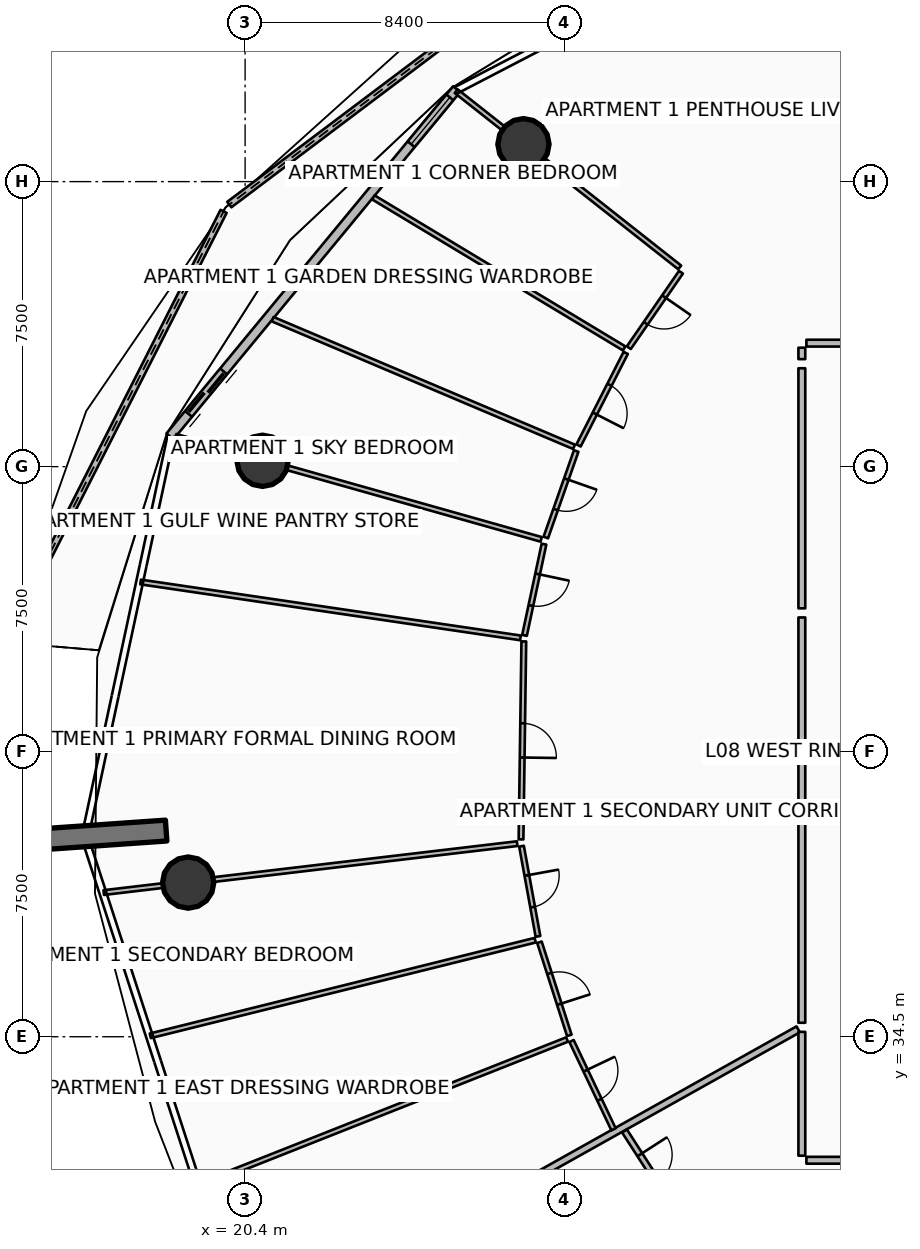
"""IFC4 building model, lengths in metres.
Left out: names, types, materials, properties, quantities, classifications, styles, units other than length and angle.
Written with IfcOpenShell. Run it as: python <this file> out.ifc"""

import sys

from ifc_helpers import new_model, si_unit, direction, frame, frame_2d, origin, origin_2d, place, context, subcontext, project, spatial, polyline, rectangle, circle, outline, extrude, element, fill, save


model = new_model("IFC4")
c1 = context("Model", 3, precision=1e-05, world=origin(), true_north=direction((0.0, 1.0)))
c2 = subcontext(c1, "Body", "Model", "MODEL_VIEW")
j1 = project(units=[si_unit("LENGTHUNIT", "METRE"), si_unit("PLANEANGLEUNIT", "RADIAN")], contexts=[c1])
p1 = place(None, origin())
s1 = spatial("IfcSite", under=j1, at=p1, CompositionType="ELEMENT")
p2 = place(p1, origin())
s2 = spatial("IfcBuilding", under=s1, at=p2, CompositionType="ELEMENT")
p3 = place(p2, frame((0.0, 0.0, 37.65)))
s3 = spatial("IfcBuildingStorey", under=s2, at=p3, CompositionType="ELEMENT", Elevation=37.65)
p4 = place(p3, frame((18.322, 39.925, 0.0), z_axis=(0.0, 0.0, 1.0), x_axis=(-0.997564163539, -0.069754853754, 0.0)))
e1 = element("IfcWall", 1, at=p4, inside=s3, PredefinedType="SOLIDWALL", context=c2, shape_type="SweptSolid", body=[
    extrude(rectangle(XDim=3.5, YDim=0.55, at=frame_2d((1.75, 0.0))), origin(), (0.0, 0.0, 1.0), 3.75),
])
for number, where, z_axis, x_axis in (
    (2, (27.724, 57.984, 0.0), (0.0, 0.0, 1.0), (1.0, 0.0, 0.0)),
    (3, (20.859, 49.655, 0.0), (0.0, 0.0, 1.0), (1.0, 0.0, 0.0)),
    (4, (18.902, 38.556, 0.0), (0.0, 0.0, 1.0), (1.0, 0.0, 0.0)),
):
    element("IfcColumn", number, at=place(p3, frame(where, z_axis=z_axis, x_axis=x_axis)), inside=s3, PredefinedType="COLUMN", context=c2, shape_type="SweptSolid", body=[
        extrude(circle(Radius=0.675, at=origin_2d()), origin(), (0.0, 0.0, 1.0), 3.5),
    ])
p5 = place(p3, frame((29.413, 63.495, 0.0), z_axis=(0.0, 0.0, 1.0), x_axis=(-0.798916487869, -0.601441971773, 0.0)))
e5 = element("IfcWall", 5, at=p5, inside=s3, PredefinedType="PARAPET", context=c2, shape_type="SweptSolid", body=[
    extrude(outline(polyline([(0.0, 0.0), (11.803, 0.0), (11.803, 1.348), (5.902, 1.182), (0.0, 1.12), (0.0, 0.0)])), frame((0.0, 0.09, 0.0), z_axis=(0.0, -1.0, 0.0), x_axis=(1.0, 0.0, 0.0)), (0.0, 0.0, 1.0), 0.18),
])
p6 = place(p3, frame((19.833, 56.217, 0.0), z_axis=(0.0, 0.0, 1.0), x_axis=(-0.452795448166, -0.891614424581, 0.0)))
e6 = element("IfcWall", 6, at=p6, inside=s3, PredefinedType="PARAPET", context=c2, shape_type="SweptSolid", body=[
    extrude(outline(polyline([(0.0, 0.0), (12.717, 0.0), (12.717, 1.747), (6.358, 1.562), (0.0, 1.348), (0.0, 0.0)])), frame((0.0, 0.09, 0.0), z_axis=(0.0, -1.0, 0.0), x_axis=(1.0, 0.0, 0.0)), (0.0, 0.0, 1.0), 0.18),
])
p7 = place(p3, frame((25.967, 59.433, 0.0), z_axis=(0.0, 0.0, 1.0), x_axis=(-0.636674332663, -0.771132799281, 0.0)))
e7 = element("IfcWall", 7, at=p7, inside=s3, PredefinedType="SOLIDWALL", context=c2, shape_type="SweptSolid", body=[
    extrude(rectangle(XDim=11.851, YDim=0.24, at=frame_2d((5.926, 0.0))), origin(), (0.0, 0.0, 1.0), 2.45),
])
p8 = place(p7, frame((9.631, 0.0, 0.0)))
e8 = element("IfcOpeningElement", 8, at=p8, cuts=e7, PredefinedType="OPENING", context=c2, shape_type="SweptSolid", body=[
    extrude(rectangle(XDim=1.45, YDim=2.15, at=frame_2d((0.725, 1.075))), frame((0.0, 0.13, 0.0), z_axis=(0.0, -1.0, 0.0), x_axis=(1.0, 0.0, 0.0)), (0.0, 0.0, 1.0), 0.26),
])
p9 = place(p7, frame((0.28, 0.0, 0.65)))
e9 = element("IfcOpeningElement", 9, at=p9, cuts=e7, PredefinedType="OPENING", context=c2, shape_type="SweptSolid", body=[
    extrude(rectangle(XDim=1.6, YDim=1.5, at=frame_2d((0.8, 0.75))), frame((0.0, 0.13, 0.0), z_axis=(0.0, -1.0, 0.0), x_axis=(1.0, 0.0, 0.0)), (0.0, 0.0, 1.0), 0.26),
])
p10 = place(p3, frame((34.954, 34.694, 0.0), z_axis=(0.0, 0.0, 1.0), x_axis=(-0.872493465611, -0.488625779577, 0.0)))
e10 = element("IfcWall", 10, at=p10, inside=s3, PredefinedType="PARTITIONING", context=c2, shape_type="SweptSolid", body=[
    extrude(rectangle(XDim=16.586, YDim=0.18, at=frame_2d((8.293, 0.0))), origin(), (0.0, 0.0, 1.0), 2.867),
])
p11 = place(p3, frame((41.86, 52.75, 0.0), z_axis=(0.0, 0.0, 1.0), x_axis=(-1.0, 0.0, 0.0)))
e11 = element("IfcWall", 11, at=p11, inside=s3, PredefinedType="PARTITIONING", context=c2, shape_type="SweptSolid", body=[
    extrude(rectangle(XDim=6.69, YDim=0.18, at=frame_2d((3.345, 0.0))), origin(), (0.0, 0.0, 1.0), 2.867),
])
p12 = place(p11, frame((2.795, 0.0, 0.0)))
e12 = element("IfcOpeningElement", 12, at=p12, cuts=e11, PredefinedType="OPENING", context=c2, shape_type="SweptSolid", body=[
    extrude(rectangle(XDim=1.1, YDim=2.1, at=frame_2d((0.55, 1.05))), frame((0.0, 0.1, 0.0), z_axis=(0.0, -1.0, 0.0), x_axis=(1.0, 0.0, 0.0)), (0.0, 0.0, 1.0), 0.2),
])
p13 = place(p3, frame((35.05, 52.63, 0.0), z_axis=(0.0, 0.0, 1.0), x_axis=(0.0, -1.0, 0.0)))
e13 = element("IfcWall", 13, at=p13, inside=s3, PredefinedType="PARTITIONING", context=c2, shape_type="SweptSolid", body=[
    extrude(rectangle(XDim=0.301, YDim=0.18, at=frame_2d((0.15, 0.0))), origin(), (0.0, 0.0, 1.0), 2.867),
])
p14 = place(p3, frame((37.943, 59.958, 0.0), z_axis=(0.0, 0.0, 1.0), x_axis=(-0.488606395453, 0.872504321091, 0.0)))
e14 = element("IfcWall", 14, at=p14, inside=s3, PredefinedType="PARTITIONING", context=c2, shape_type="SweptSolid", body=[
    extrude(rectangle(XDim=4.913, YDim=0.125, at=frame_2d((2.457, 0.0))), origin(), (0.0, 0.0, 1.0), 2.867),
])
p15 = place(p3, frame((35.05, 52.089, 0.0), z_axis=(0.0, 0.0, 1.0), x_axis=(0.0, -1.0, 0.0)))
e15 = element("IfcWall", 15, at=p15, inside=s3, PredefinedType="PARTITIONING", context=c2, shape_type="SweptSolid", body=[
    extrude(rectangle(XDim=6.317, YDim=0.18, at=frame_2d((3.158, 0.0))), origin(), (0.0, 0.0, 1.0), 2.867),
])
p16 = place(p3, frame((31.836, 54.743, 0.0), z_axis=(0.0, 0.0, 1.0), x_axis=(-0.785333171854, 0.619073347178, 0.0)))
e16 = element("IfcWall", 16, at=p16, inside=s3, PredefinedType="PARTITIONING", context=c2, shape_type="SweptSolid", body=[
    extrude(rectangle(XDim=7.489, YDim=0.125, at=frame_2d((3.745, 0.0))), origin(), (0.0, 0.0, 1.0), 2.867),
])
p17 = place(p3, frame((30.375, 52.611, 0.0), z_axis=(0.0, 0.0, 1.0), x_axis=(-0.856697740307, 0.515818748936, 0.0)))
e17 = element("IfcWall", 17, at=p17, inside=s3, PredefinedType="PARTITIONING", context=c2, shape_type="SweptSolid", body=[
    extrude(rectangle(XDim=7.704, YDim=0.125, at=frame_2d((3.852, 0.0))), origin(), (0.0, 0.0, 1.0), 2.94),
])
p18 = place(p3, frame((29.055, 50.022, 0.0), z_axis=(0.0, 0.0, 1.0), x_axis=(-0.920841617163, 0.389936810395, 0.0)))
e18 = element("IfcWall", 18, at=p18, inside=s3, PredefinedType="PARTITIONING", context=c2, shape_type="SweptSolid", body=[
    extrude(rectangle(XDim=8.613, YDim=0.125, at=frame_2d((4.306, 0.0))), origin(), (0.0, 0.0, 1.0), 2.94),
])
p19 = place(p3, frame((31.869, 54.615, 0.0), z_axis=(0.0, 0.0, 1.0), x_axis=(-0.568588801709, -0.822621890404, 0.0)))
e19 = element("IfcWall", 19, at=p19, inside=s3, PredefinedType="PARTITIONING", context=c2, shape_type="SweptSolid", body=[
    extrude(rectangle(XDim=2.412, YDim=0.125, at=frame_2d((1.206, 0.0))), origin(), (0.0, 0.0, 1.0), 2.867),
])
p20 = place(p19, frame((0.781, 0.0, 0.0)))
e20 = element("IfcOpeningElement", 20, at=p20, cuts=e19, PredefinedType="OPENING", context=c2, shape_type="SweptSolid", body=[
    extrude(rectangle(XDim=0.85, YDim=2.06, at=frame_2d((0.425, 1.03))), frame((0.0, 0.073, 0.0), z_axis=(0.0, -1.0, 0.0), x_axis=(1.0, 0.0, 0.0)), (0.0, 0.0, 1.0), 0.145),
])
p21 = place(p3, frame((30.416, 52.493, 0.0), z_axis=(0.0, 0.0, 1.0), x_axis=(-0.454024795493, -0.890989048798, 0.0)))
e21 = element("IfcWall", 21, at=p21, inside=s3, PredefinedType="PARTITIONING", context=c2, shape_type="SweptSolid", body=[
    extrude(rectangle(XDim=2.733, YDim=0.125, at=frame_2d((1.367, 0.0))), origin(), (0.0, 0.0, 1.0), 2.94),
])
p22 = place(p21, frame((0.942, 0.0, 0.0)))
e22 = element("IfcOpeningElement", 22, at=p22, cuts=e21, PredefinedType="OPENING", context=c2, shape_type="SweptSolid", body=[
    extrude(rectangle(XDim=0.85, YDim=2.06, at=frame_2d((0.425, 1.03))), frame((0.0, 0.073, 0.0), z_axis=(0.0, -1.0, 0.0), x_axis=(1.0, 0.0, 0.0)), (0.0, 0.0, 1.0), 0.145),
])
p23 = place(p3, frame((29.112, 49.911, 0.0), z_axis=(0.0, 0.0, 1.0), x_axis=(-0.331369117911, -0.943501196446, 0.0)))
e23 = element("IfcWall", 23, at=p23, inside=s3, PredefinedType="PARTITIONING", context=c2, shape_type="SweptSolid", body=[
    extrude(rectangle(XDim=2.412, YDim=0.125, at=frame_2d((1.206, 0.0))), origin(), (0.0, 0.0, 1.0), 2.867),
])
p24 = place(p23, frame((0.781, 0.0, 0.0)))
e24 = element("IfcOpeningElement", 24, at=p24, cuts=e23, PredefinedType="OPENING", context=c2, shape_type="SweptSolid", body=[
    extrude(rectangle(XDim=0.85, YDim=2.06, at=frame_2d((0.425, 1.03))), frame((0.0, 0.073, 0.0), z_axis=(0.0, -1.0, 0.0), x_axis=(1.0, 0.0, 0.0)), (0.0, 0.0, 1.0), 0.145),
])
p25 = place(p3, frame((35.05, 45.532, 0.0), z_axis=(0.0, 0.0, 1.0), x_axis=(0.0, -1.0, 0.0)))
e25 = element("IfcWall", 25, at=p25, inside=s3, PredefinedType="PARTITIONING", context=c2, shape_type="SweptSolid", body=[
    extrude(rectangle(XDim=4.945, YDim=0.18, at=frame_2d((2.472, 0.0))), origin(), (0.0, 0.0, 1.0), 2.867),
])
p26 = place(p3, frame((28.19, 47.587, 0.0), z_axis=(0.0, 0.0, 1.0), x_axis=(-0.962452458747, 0.271450298675, 0.0)))
e26 = element("IfcWall", 26, at=p26, inside=s3, PredefinedType="PARTITIONING", context=c2, shape_type="SweptSolid", body=[
    extrude(rectangle(XDim=9.991, YDim=0.125, at=frame_2d((4.996, 0.0))), origin(), (0.0, 0.0, 1.0), 2.867),
])
p27 = place(p3, frame((27.646, 44.995, 0.0), z_axis=(0.0, 0.0, 1.0), x_axis=(-0.989346856364, 0.145577463234, 0.0)))
e27 = element("IfcWall", 27, at=p27, inside=s3, PredefinedType="PARTITIONING", context=c2, shape_type="SweptSolid", body=[
    extrude(rectangle(XDim=10.104, YDim=0.125, at=frame_2d((5.052, 0.0))), origin(), (0.0, 0.0, 1.0), 2.94),
])
p28 = place(p3, frame((28.265, 47.462, 0.0), z_axis=(0.0, 0.0, 1.0), x_axis=(-0.20890462523, -0.977936019153, 0.0)))
e28 = element("IfcWall", 28, at=p28, inside=s3, PredefinedType="PARTITIONING", context=c2, shape_type="SweptSolid", body=[
    extrude(rectangle(XDim=2.457, YDim=0.125, at=frame_2d((1.228, 0.0))), origin(), (0.0, 0.0, 1.0), 2.867),
])
p29 = place(p28, frame((0.803, 0.0, 0.0)))
e29 = element("IfcOpeningElement", 29, at=p29, cuts=e28, PredefinedType="OPENING", context=c2, shape_type="SweptSolid", body=[
    extrude(rectangle(XDim=0.85, YDim=2.06, at=frame_2d((0.425, 1.03))), frame((0.0, 0.073, 0.0), z_axis=(0.0, -1.0, 0.0), x_axis=(1.0, 0.0, 0.0)), (0.0, 0.0, 1.0), 0.145),
])
p30 = place(p3, frame((27.734, 44.902, 0.0), z_axis=(0.0, 0.0, 1.0), x_axis=(-0.014152399805, -0.999899849775, 0.0)))
e30 = element("IfcWall", 30, at=p30, inside=s3, PredefinedType="PARTITIONING", context=c2, shape_type="SweptSolid", body=[
    extrude(rectangle(XDim=5.21, YDim=0.125, at=frame_2d((2.605, 0.0))), origin(), (0.0, 0.0, 1.0), 2.867),
])
p31 = place(p30, frame((2.155, 0.0, 0.0)))
e31 = element("IfcOpeningElement", 31, at=p31, cuts=e30, PredefinedType="OPENING", context=c2, shape_type="SweptSolid", body=[
    extrude(rectangle(XDim=0.9, YDim=2.08, at=frame_2d((0.45, 1.04))), frame((0.0, 0.073, 0.0), z_axis=(0.0, -1.0, 0.0), x_axis=(1.0, 0.0, 0.0)), (0.0, 0.0, 1.0), 0.145),
])
p32 = place(p3, frame((35.05, 40.347, 0.0), z_axis=(0.0, 0.0, 1.0), x_axis=(0.0, -1.0, 0.0)))
e32 = element("IfcWall", 32, at=p32, inside=s3, PredefinedType="PARTITIONING", context=c2, shape_type="SweptSolid", body=[
    extrude(rectangle(XDim=5.48, YDim=0.18, at=frame_2d((2.74, 0.0))), origin(), (0.0, 0.0, 1.0), 2.867),
])
p33 = place(p3, frame((27.56, 39.581, 0.0), z_axis=(0.0, 0.0, 1.0), x_axis=(-0.993067148518, -0.117548451854, 0.0)))
e33 = element("IfcWall", 33, at=p33, inside=s3, PredefinedType="PARTITIONING", context=c2, shape_type="SweptSolid", body=[
    extrude(rectangle(XDim=10.956, YDim=0.125, at=frame_2d((5.478, 0.0))), origin(), (0.0, 0.0, 1.0), 2.867),
])
p34 = place(p3, frame((28.034, 37.04, 0.0), z_axis=(0.0, 0.0, 1.0), x_axis=(-0.970510155377, -0.241060237928, 0.0)))
e34 = element("IfcWall", 34, at=p34, inside=s3, PredefinedType="PARTITIONING", context=c2, shape_type="SweptSolid", body=[
    extrude(rectangle(XDim=10.437, YDim=0.125, at=frame_2d((5.218, 0.0))), origin(), (0.0, 0.0, 1.0), 2.94),
])
p35 = place(p3, frame((28.872, 34.427, 0.0), z_axis=(0.0, 0.0, 1.0), x_axis=(-0.929776542834, -0.368124408855, 0.0)))
e35 = element("IfcWall", 35, at=p35, inside=s3, PredefinedType="PARTITIONING", context=c2, shape_type="SweptSolid", body=[
    extrude(rectangle(XDim=10.42, YDim=0.125, at=frame_2d((5.21, 0.0))), origin(), (0.0, 0.0, 1.0), 2.94),
])
p36 = place(p3, frame((27.673, 39.514, 0.0), z_axis=(0.0, 0.0, 1.0), x_axis=(0.179642413558, -0.983731977345, 0.0)))
e36 = element("IfcWall", 36, at=p36, inside=s3, PredefinedType="PARTITIONING", context=c2, shape_type="SweptSolid", body=[
    extrude(rectangle(XDim=2.412, YDim=0.125, at=frame_2d((1.206, 0.0))), origin(), (0.0, 0.0, 1.0), 2.867),
])
p37 = place(p36, frame((0.781, 0.0, 0.0)))
e37 = element("IfcOpeningElement", 37, at=p37, cuts=e36, PredefinedType="OPENING", context=c2, shape_type="SweptSolid", body=[
    extrude(rectangle(XDim=0.85, YDim=2.06, at=frame_2d((0.425, 1.03))), frame((0.0, 0.073, 0.0), z_axis=(0.0, -1.0, 0.0), x_axis=(1.0, 0.0, 0.0)), (0.0, 0.0, 1.0), 0.145),
])
p38 = place(p3, frame((28.146, 36.986, 0.0), z_axis=(0.0, 0.0, 1.0), x_axis=(0.305274947668, -0.952264252362, 0.0)))
e38 = element("IfcWall", 38, at=p38, inside=s3, PredefinedType="PARTITIONING", context=c2, shape_type="SweptSolid", body=[
    extrude(rectangle(XDim=2.573, YDim=0.125, at=frame_2d((1.286, 0.0))), origin(), (0.0, 0.0, 1.0), 2.94),
])
p39 = place(p38, frame((0.861, 0.0, 0.0)))
e39 = element("IfcOpeningElement", 39, at=p39, cuts=e38, PredefinedType="OPENING", context=c2, shape_type="SweptSolid", body=[
    extrude(rectangle(XDim=0.85, YDim=2.06, at=frame_2d((0.425, 1.03))), frame((0.0, 0.073, 0.0), z_axis=(0.0, -1.0, 0.0), x_axis=(1.0, 0.0, 0.0)), (0.0, 0.0, 1.0), 0.145),
])
p40 = place(p3, frame((28.99, 34.387, 0.0), z_axis=(0.0, 0.0, 1.0), x_axis=(0.429399392499, -0.903114700202, 0.0)))
e40 = element("IfcWall", 40, at=p40, inside=s3, PredefinedType="PARTITIONING", context=c2, shape_type="SweptSolid", body=[
    extrude(rectangle(XDim=2.573, YDim=0.125, at=frame_2d((1.286, 0.0))), origin(), (0.0, 0.0, 1.0), 2.867),
])
p41 = place(p40, frame((0.861, 0.0, 0.0)))
e41 = element("IfcOpeningElement", 41, at=p41, cuts=e40, PredefinedType="OPENING", context=c2, shape_type="SweptSolid", body=[
    extrude(rectangle(XDim=0.85, YDim=2.06, at=frame_2d((0.425, 1.03))), frame((0.0, 0.073, 0.0), z_axis=(0.0, -1.0, 0.0), x_axis=(1.0, 0.0, 0.0)), (0.0, 0.0, 1.0), 0.145),
])
p42 = place(p3, frame((35.05, 34.628, 0.0), z_axis=(0.0, 0.0, 1.0), x_axis=(0.0, -1.0, 0.0)))
e42 = element("IfcWall", 42, at=p42, inside=s3, PredefinedType="PARTITIONING", context=c2, shape_type="SweptSolid", body=[
    extrude(rectangle(XDim=3.258, YDim=0.18, at=frame_2d((1.629, 0.0))), origin(), (0.0, 0.0, 1.0), 2.867),
])
p43 = place(p3, frame((35.17, 31.25, 0.0), z_axis=(0.0, 0.0, 1.0), x_axis=(1.0, 0.0, 0.0)))
e43 = element("IfcWall", 43, at=p43, inside=s3, PredefinedType="PARTITIONING", context=c2, shape_type="SweptSolid", body=[
    extrude(rectangle(XDim=4.236, YDim=0.18, at=frame_2d((2.118, 0.0))), origin(), (0.0, 0.0, 1.0), 2.867),
])
p44 = place(p3, frame((30.384, 32.02, 0.0), z_axis=(0.0, 0.0, 1.0), x_axis=(0.542055500246, -0.84034268882, 0.0)))
e44 = element("IfcWall", 44, at=p44, inside=s3, PredefinedType="PARTITIONING", context=c2, shape_type="SweptSolid", body=[
    extrude(rectangle(XDim=2.338, YDim=0.15, at=frame_2d((1.169, 0.0))), origin(), (0.0, 0.0, 1.0), 2.867),
])
p45 = place(p44, frame((0.744, 0.0, 0.0)))
e45 = element("IfcOpeningElement", 45, at=p45, cuts=e44, PredefinedType="OPENING", context=c2, shape_type="SweptSolid", body=[
    extrude(rectangle(XDim=0.85, YDim=2.06, at=frame_2d((0.425, 1.03))), frame((0.0, 0.085, 0.0), z_axis=(0.0, -1.0, 0.0), x_axis=(1.0, 0.0, 0.0)), (0.0, 0.0, 1.0), 0.17),
])
p46 = place(p8, origin())
e46 = element("IfcDoor", 46, at=p46, inside=s3, OperationType="DOUBLE_DOOR_SLIDING", PredefinedType="DOOR", context=c2, shape_type="SweptSolid", body=[
    extrude(rectangle(XDim=1.45, YDim=2.15, at=frame_2d((0.725, 1.075))), frame((0.0, 0.025, 0.0), z_axis=(0.0, -1.0, 0.0), x_axis=(1.0, 0.0, 0.0)), (0.0, 0.0, 1.0), 0.05),
])
fill(e8, e46)
p47 = place(p9, origin())
e47 = element("IfcWindow", 47, at=p47, inside=s3, PartitioningType="SINGLE_PANEL", PredefinedType="WINDOW", context=c2, shape_type="SweptSolid", body=[
    extrude(rectangle(XDim=1.6, YDim=1.5, at=frame_2d((0.8, 0.75))), frame((0.0, 0.03, 0.0), z_axis=(0.0, -1.0, 0.0), x_axis=(1.0, 0.0, 0.0)), (0.0, 0.0, 1.0), 0.06),
])
fill(e9, e47)
p48 = place(p20, origin())
e48 = element("IfcDoor", 48, at=p48, inside=s3, OperationType="SINGLE_SWING_LEFT", PredefinedType="DOOR", context=c2, shape_type="SweptSolid", body=[
    extrude(rectangle(XDim=0.85, YDim=2.06, at=frame_2d((0.425, 1.03))), frame((0.0, 0.025, 0.0), z_axis=(0.0, -1.0, 0.0), x_axis=(1.0, 0.0, 0.0)), (0.0, 0.0, 1.0), 0.05),
])
fill(e20, e48)
p49 = place(p22, origin())
e49 = element("IfcDoor", 49, at=p49, inside=s3, OperationType="SINGLE_SWING_RIGHT", PredefinedType="DOOR", context=c2, shape_type="SweptSolid", body=[
    extrude(rectangle(XDim=0.85, YDim=2.06, at=frame_2d((0.425, 1.03))), frame((0.0, 0.025, 0.0), z_axis=(0.0, -1.0, 0.0), x_axis=(1.0, 0.0, 0.0)), (0.0, 0.0, 1.0), 0.05),
])
fill(e22, e49)
p50 = place(p24, origin())
e50 = element("IfcDoor", 50, at=p50, inside=s3, OperationType="SINGLE_SWING_LEFT", PredefinedType="DOOR", context=c2, shape_type="SweptSolid", body=[
    extrude(rectangle(XDim=0.85, YDim=2.06, at=frame_2d((0.425, 1.03))), frame((0.0, 0.025, 0.0), z_axis=(0.0, -1.0, 0.0), x_axis=(1.0, 0.0, 0.0)), (0.0, 0.0, 1.0), 0.05),
])
fill(e24, e50)
p51 = place(p29, origin())
e51 = element("IfcDoor", 51, at=p51, inside=s3, OperationType="SINGLE_SWING_LEFT", PredefinedType="DOOR", context=c2, shape_type="SweptSolid", body=[
    extrude(rectangle(XDim=0.85, YDim=2.06, at=frame_2d((0.425, 1.03))), frame((0.0, 0.025, 0.0), z_axis=(0.0, -1.0, 0.0), x_axis=(1.0, 0.0, 0.0)), (0.0, 0.0, 1.0), 0.05),
])
fill(e29, e51)
p52 = place(p31, origin())
e52 = element("IfcDoor", 52, at=p52, inside=s3, OperationType="SINGLE_SWING_RIGHT", PredefinedType="DOOR", context=c2, shape_type="SweptSolid", body=[
    extrude(rectangle(XDim=0.9, YDim=2.08, at=frame_2d((0.45, 1.04))), frame((0.0, 0.025, 0.0), z_axis=(0.0, -1.0, 0.0), x_axis=(1.0, 0.0, 0.0)), (0.0, 0.0, 1.0), 0.05),
])
fill(e31, e52)
p53 = place(p37, origin())
e53 = element("IfcDoor", 53, at=p53, inside=s3, OperationType="SINGLE_SWING_LEFT", PredefinedType="DOOR", context=c2, shape_type="SweptSolid", body=[
    extrude(rectangle(XDim=0.85, YDim=2.06, at=frame_2d((0.425, 1.03))), frame((0.0, 0.025, 0.0), z_axis=(0.0, -1.0, 0.0), x_axis=(1.0, 0.0, 0.0)), (0.0, 0.0, 1.0), 0.05),
])
fill(e37, e53)
p54 = place(p39, origin())
e54 = element("IfcDoor", 54, at=p54, inside=s3, OperationType="SINGLE_SWING_RIGHT", PredefinedType="DOOR", context=c2, shape_type="SweptSolid", body=[
    extrude(rectangle(XDim=0.85, YDim=2.06, at=frame_2d((0.425, 1.03))), frame((0.0, 0.025, 0.0), z_axis=(0.0, -1.0, 0.0), x_axis=(1.0, 0.0, 0.0)), (0.0, 0.0, 1.0), 0.05),
])
fill(e39, e54)
p55 = place(p41, origin())
e55 = element("IfcDoor", 55, at=p55, inside=s3, OperationType="SINGLE_SWING_LEFT", PredefinedType="DOOR", context=c2, shape_type="SweptSolid", body=[
    extrude(rectangle(XDim=0.85, YDim=2.06, at=frame_2d((0.425, 1.03))), frame((0.0, 0.025, 0.0), z_axis=(0.0, -1.0, 0.0), x_axis=(1.0, 0.0, 0.0)), (0.0, 0.0, 1.0), 0.05),
])
fill(e41, e55)
p56 = place(p45, origin())
e56 = element("IfcDoor", 56, at=p56, inside=s3, OperationType="SINGLE_SWING_LEFT", PredefinedType="DOOR", context=c2, shape_type="SweptSolid", body=[
    extrude(rectangle(XDim=0.85, YDim=2.06, at=frame_2d((0.425, 1.03))), frame((0.0, 0.025, 0.0), z_axis=(0.0, -1.0, 0.0), x_axis=(1.0, 0.0, 0.0)), (0.0, 0.0, 1.0), 0.05),
])
fill(e45, e56)
save(model, sys.argv[1])
